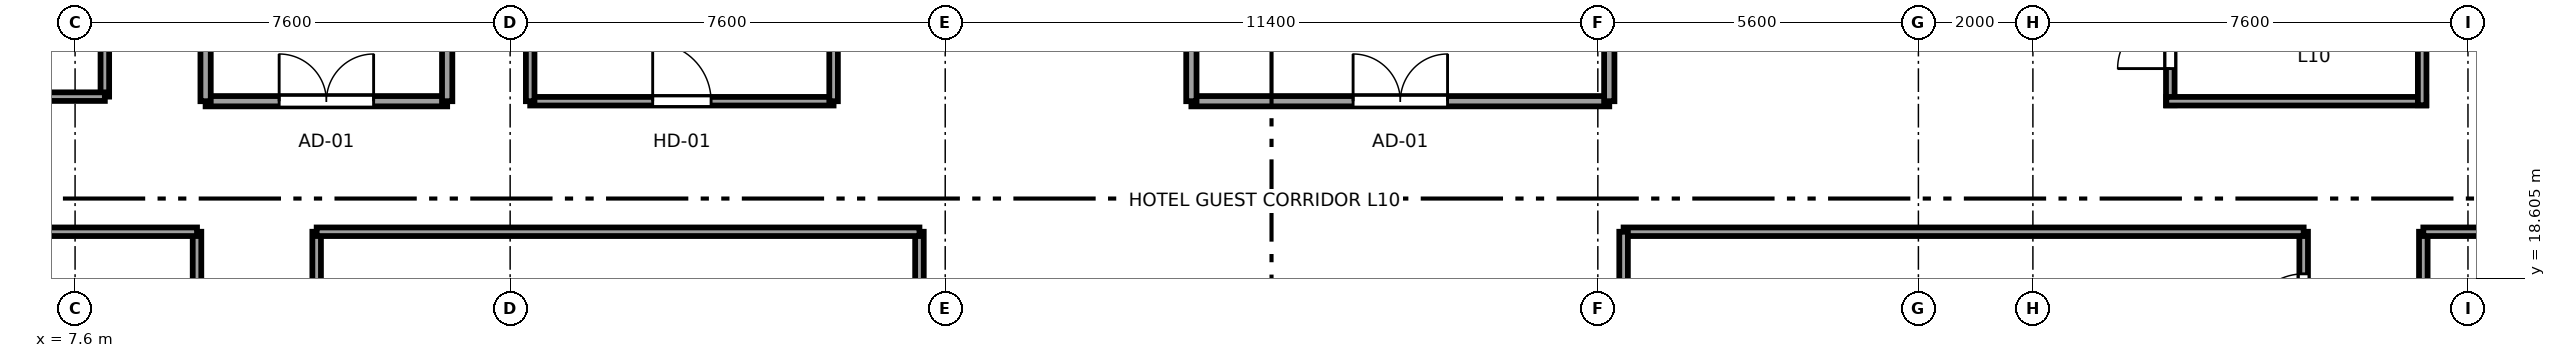
"""IFC4 building model, lengths in metres.
Left out: names, types, materials, properties, quantities, classifications, styles, units other than length and angle.
Written with IfcOpenShell. Run it as: python <this file> out.ifc"""

import sys

from ifc_helpers import new_model, si_unit, direction, frame, frame_2d, origin, place, context, subcontext, project, spatial, rectangle, extrude, source, transform, mapped, element, fill, save


model = new_model("IFC4")
c1 = context("Model", 3, precision=1e-05, world=origin(), true_north=direction((0.0, 1.0)))
c2 = subcontext(c1, "Body", "Model", "MODEL_VIEW")
j1 = project(units=[si_unit("LENGTHUNIT", "METRE"), si_unit("PLANEANGLEUNIT", "RADIAN")], contexts=[c1])
p1 = place(None, origin())
s1 = spatial("IfcSite", under=j1, at=p1, CompositionType="ELEMENT")
p2 = place(p1, origin())
s2 = spatial("IfcBuilding", under=s1, at=p2, CompositionType="ELEMENT")
p3 = place(p2, frame((0.0, 0.0, 46.2)))
s3 = spatial("IfcBuildingStorey", under=s2, at=p3, CompositionType="ELEMENT", Elevation=46.2)
p4 = place(p3, frame((9.73, 15.61, 0.0), z_axis=(0.0, 0.0, 1.0), x_axis=(0.0, 1.0, 0.0)))
e1 = element("IfcWall", 1, at=p4, inside=s3, PredefinedType="PARTITIONING", context=c2, shape_type="SweptSolid", body=[
    extrude(rectangle(XDim=3.81, YDim=0.15, at=frame_2d((1.905, 0.0))), origin(), (0.0, 0.0, 1.0), 3.37),
])
p5 = place(p4, frame((1.395, 0.0, 0.0)))
e2 = element("IfcOpeningElement", 2, at=p5, cuts=e1, PredefinedType="OPENING", context=c2, shape_type="SweptSolid", body=[
    extrude(rectangle(XDim=0.98, YDim=2.12, at=frame_2d((0.49, 1.06))), frame((0.0, 0.085, 0.0), z_axis=(0.0, -1.0, 0.0), x_axis=(1.0, 0.0, 0.0)), (0.0, 0.0, 1.0), 0.17),
])
p6 = place(p3, frame((0.405, 19.42, 0.0), z_axis=(0.0, 0.0, 1.0), x_axis=(1.0, 0.0, 0.0)))
e3 = element("IfcWall", 3, at=p6, inside=s3, PredefinedType="PARTITIONING", context=c2, shape_type="SweptSolid", body=[
    extrude(rectangle(XDim=9.325, YDim=0.15, at=frame_2d((4.663, 0.0))), origin(), (0.0, 0.0, 1.0), 3.37),
])
p7 = place(p3, frame((11.82, 16.81, 0.0), z_axis=(0.0, 0.0, 1.0), x_axis=(0.0, 1.0, 0.0)))
e4 = element("IfcWall", 4, at=p7, inside=s3, PredefinedType="PARTITIONING", context=c2, shape_type="SweptSolid", body=[
    extrude(rectangle(XDim=2.61, YDim=0.15, at=frame_2d((1.305, 0.0))), origin(), (0.0, 0.0, 1.0), 3.37),
])
p8 = place(p7, frame((0.795, 0.0, 0.0)))
e5 = element("IfcOpeningElement", 5, at=p8, cuts=e4, PredefinedType="OPENING", context=c2, shape_type="SweptSolid", body=[
    extrude(rectangle(XDim=0.98, YDim=2.12, at=frame_2d((0.49, 1.06))), frame((0.0, 0.085, 0.0), z_axis=(0.0, -1.0, 0.0), x_axis=(1.0, 0.0, 0.0)), (0.0, 0.0, 1.0), 0.17),
])
p9 = place(p3, frame((22.35, 14.88, 0.0), z_axis=(0.0, 0.0, 1.0), x_axis=(0.0, 1.0, 0.0)))
e6 = element("IfcWall", 6, at=p9, inside=s3, PredefinedType="PARTITIONING", context=c2, shape_type="SweptSolid", body=[
    extrude(rectangle(XDim=4.54, YDim=0.15, at=frame_2d((2.27, 0.0))), origin(), (0.0, 0.0, 1.0), 3.37),
])
p10 = place(p3, frame((11.82, 19.42, 0.0), z_axis=(0.0, 0.0, 1.0), x_axis=(1.0, 0.0, 0.0)))
e7 = element("IfcWall", 7, at=p10, inside=s3, PredefinedType="PARTITIONING", context=c2, shape_type="SweptSolid", body=[
    extrude(rectangle(XDim=10.53, YDim=0.15, at=frame_2d((5.265, 0.0))), origin(), (0.0, 0.0, 1.0), 3.37),
])
p11 = place(p3, frame((46.53, 17.01, 0.0), z_axis=(0.0, 0.0, 1.0), x_axis=(0.0, 1.0, 0.0)))
e8 = element("IfcWall", 8, at=p11, inside=s3, PredefinedType="PARTITIONING", context=c2, shape_type="SweptSolid", body=[
    extrude(rectangle(XDim=2.41, YDim=0.15, at=frame_2d((1.205, 0.0))), origin(), (0.0, 0.0, 1.0), 3.37),
])
p12 = place(p11, frame((0.695, 0.0, 0.0)))
e9 = element("IfcOpeningElement", 9, at=p12, cuts=e8, PredefinedType="OPENING", context=c2, shape_type="SweptSolid", body=[
    extrude(rectangle(XDim=0.98, YDim=2.12, at=frame_2d((0.49, 1.06))), frame((0.0, 0.085, 0.0), z_axis=(0.0, -1.0, 0.0), x_axis=(1.0, 0.0, 0.0)), (0.0, 0.0, 1.0), 0.17),
])
p13 = place(p3, frame((34.65, 19.42, 0.0), z_axis=(0.0, 0.0, 1.0), x_axis=(1.0, 0.0, 0.0)))
e10 = element("IfcWall", 10, at=p13, inside=s3, PredefinedType="PARTITIONING", context=c2, shape_type="SweptSolid", body=[
    extrude(rectangle(XDim=11.88, YDim=0.15, at=frame_2d((5.94, 0.0))), origin(), (0.0, 0.0, 1.0), 3.37),
])
p14 = place(p3, frame((34.65, 15.08, 0.0), z_axis=(0.0, 0.0, 1.0), x_axis=(0.0, 1.0, 0.0)))
e11 = element("IfcWall", 11, at=p14, inside=s3, PredefinedType="PARTITIONING", context=c2, shape_type="SweptSolid", body=[
    extrude(rectangle(XDim=4.34, YDim=0.15, at=frame_2d((2.17, 0.0))), origin(), (0.0, 0.0, 1.0), 3.37),
])
p15 = place(p3, frame((48.62, 15.41, 0.0), z_axis=(0.0, 0.0, 1.0), x_axis=(0.0, 1.0, 0.0)))
e12 = element("IfcWall", 12, at=p15, inside=s3, PredefinedType="PARTITIONING", context=c2, shape_type="SweptSolid", body=[
    extrude(rectangle(XDim=4.01, YDim=0.15, at=frame_2d((2.005, 0.0))), origin(), (0.0, 0.0, 1.0), 3.37),
])
p16 = place(p15, frame((1.795, 0.0, 0.0)))
e13 = element("IfcOpeningElement", 13, at=p16, cuts=e12, PredefinedType="OPENING", context=c2, shape_type="SweptSolid", body=[
    extrude(rectangle(XDim=0.98, YDim=2.12, at=frame_2d((0.49, 1.06))), frame((0.0, 0.085, 0.0), z_axis=(0.0, -1.0, 0.0), x_axis=(1.0, 0.0, 0.0)), (0.0, 0.0, 1.0), 0.17),
])
p17 = place(p3, frame((48.62, 19.42, 0.0), z_axis=(0.0, 0.0, 1.0), x_axis=(1.0, 0.0, 0.0)))
e14 = element("IfcWall", 14, at=p17, inside=s3, PredefinedType="PARTITIONING", context=c2, shape_type="SweptSolid", body=[
    extrude(rectangle(XDim=7.975, YDim=0.15, at=frame_2d((3.987, 0.0))), origin(), (0.0, 0.0, 1.0), 3.37),
])
p18 = place(p3, frame((8.12, 21.78, 0.0), z_axis=(0.0, 0.0, 1.0), x_axis=(0.0, 1.0, 0.0)))
e15 = element("IfcWall", 15, at=p18, inside=s3, PredefinedType="PARTITIONING", context=c2, shape_type="SweptSolid", body=[
    extrude(rectangle(XDim=5.24, YDim=0.15, at=frame_2d((2.62, 0.0))), origin(), (0.0, 0.0, 1.0), 3.37),
])
p19 = place(p18, frame((3.93, 0.0, 0.0)))
e16 = element("IfcOpeningElement", 16, at=p19, cuts=e15, PredefinedType="OPENING", context=c2, shape_type="SweptSolid", body=[
    extrude(rectangle(XDim=0.98, YDim=2.12, at=frame_2d((0.49, 1.06))), frame((0.0, 0.085, 0.0), z_axis=(0.0, -1.0, 0.0), x_axis=(1.0, 0.0, 0.0)), (0.0, 0.0, 1.0), 0.17),
])
p20 = place(p3, frame((0.405, 21.78, 0.0), z_axis=(0.0, 0.0, 1.0), x_axis=(1.0, 0.0, 0.0)))
e17 = element("IfcWall", 17, at=p20, inside=s3, PredefinedType="PARTITIONING", context=c2, shape_type="SweptSolid", body=[
    extrude(rectangle(XDim=7.715, YDim=0.15, at=frame_2d((3.857, 0.0))), origin(), (0.0, 0.0, 1.0), 3.37),
])
p21 = place(p3, frame((44.2, 21.63, 0.0), z_axis=(0.0, 0.0, 1.0), x_axis=(0.0, 1.0, 0.0)))
e18 = element("IfcWall", 18, at=p21, inside=s3, PredefinedType="PARTITIONING", context=c2, shape_type="SweptSolid", body=[
    extrude(rectangle(XDim=2.54, YDim=0.15, at=frame_2d((1.27, 0.0))), origin(), (0.0, 0.0, 1.0), 3.37),
])
p22 = place(p21, frame((0.64, 0.0, 0.0)))
e19 = element("IfcOpeningElement", 19, at=p22, cuts=e18, PredefinedType="OPENING", context=c2, shape_type="SweptSolid", body=[
    extrude(rectangle(XDim=0.92, YDim=2.01, at=frame_2d((0.46, 1.005))), frame((0.0, 0.085, 0.0), z_axis=(0.0, -1.0, 0.0), x_axis=(1.0, 0.0, 0.0)), (0.0, 0.0, 1.0), 0.17),
])
p23 = place(p3, frame((44.13, 21.7, 0.0), z_axis=(0.0, 0.0, 1.0), x_axis=(1.0, 0.0, 0.0)))
e20 = element("IfcWall", 20, at=p23, inside=s3, PredefinedType="PARTITIONING", context=c2, shape_type="SweptSolid", body=[
    extrude(rectangle(XDim=4.54, YDim=0.15, at=frame_2d((2.27, 0.0))), origin(), (0.0, 0.0, 1.0), 3.37),
])
p24 = place(p3, frame((48.6, 21.63, 0.0), z_axis=(0.0, 0.0, 1.0), x_axis=(0.0, 1.0, 0.0)))
e21 = element("IfcWall", 21, at=p24, inside=s3, PredefinedType="PARTITIONING", context=c2, shape_type="SweptSolid", body=[
    extrude(rectangle(XDim=2.54, YDim=0.15, at=frame_2d((1.27, 0.0))), origin(), (0.0, 0.0, 1.0), 3.37),
])
p25 = place(p3, frame((9.88, 21.7, 0.0), z_axis=(0.0, 0.0, 1.0), x_axis=(1.0, 0.0, 0.0)))
e22 = element("IfcWall", 22, at=p25, inside=s3, PredefinedType="PARTITIONING", context=c2, shape_type="SweptSolid", body=[
    extrude(rectangle(XDim=4.22, YDim=0.18, at=frame_2d((2.11, 0.0))), origin(), (0.0, 0.0, 1.0), 3.37),
])
p26 = place(p25, frame((1.285, 0.0, 0.0)))
e23 = element("IfcOpeningElement", 23, at=p26, cuts=e22, PredefinedType="OPENING", context=c2, shape_type="SweptSolid", body=[
    extrude(rectangle(XDim=1.65, YDim=2.15, at=frame_2d((0.825, 1.075))), frame((0.0, 0.1, 0.0), z_axis=(0.0, -1.0, 0.0), x_axis=(1.0, 0.0, 0.0)), (0.0, 0.0, 1.0), 0.2),
])
for number, where, z_axis, x_axis in (
    (24, (9.88, 21.7, 0.0), (0.0, 0.0, 1.0), (0.0, 1.0, 0.0)),
    (25, (14.1, 21.7, 0.0), (0.0, 0.0, 1.0), (0.0, 1.0, 0.0)),
):
    element("IfcWall", number, at=place(p3, frame(where, z_axis=z_axis, x_axis=x_axis)), inside=s3, PredefinedType="PARTITIONING", context=c2, shape_type="SweptSolid", body=[
        extrude(rectangle(XDim=8.05, YDim=0.18, at=frame_2d((4.025, 0.0))), origin(), (0.0, 0.0, 1.0), 3.37),
    ])
p27 = place(p3, frame((27.1, 21.7, 0.0), z_axis=(0.0, 0.0, 1.0), x_axis=(1.0, 0.0, 0.0)))
e26 = element("IfcWall", 26, at=p27, inside=s3, PredefinedType="PARTITIONING", context=c2, shape_type="SweptSolid", body=[
    extrude(rectangle(XDim=7.3, YDim=0.18, at=frame_2d((3.65, 0.0))), origin(), (0.0, 0.0, 1.0), 3.37),
])
p28 = place(p27, frame((2.825, 0.0, 0.0)))
e27 = element("IfcOpeningElement", 27, at=p28, cuts=e26, PredefinedType="OPENING", context=c2, shape_type="SweptSolid", body=[
    extrude(rectangle(XDim=1.65, YDim=2.15, at=frame_2d((0.825, 1.075))), frame((0.0, 0.1, 0.0), z_axis=(0.0, -1.0, 0.0), x_axis=(1.0, 0.0, 0.0)), (0.0, 0.0, 1.0), 0.2),
])
for number, where, z_axis, x_axis in (
    (28, (27.1, 21.7, 0.0), (0.0, 0.0, 1.0), (0.0, 1.0, 0.0)),
    (29, (34.4, 21.7, 0.0), (0.0, 0.0, 1.0), (0.0, 1.0, 0.0)),
):
    element("IfcWall", number, at=place(p3, frame(where, z_axis=z_axis, x_axis=x_axis)), inside=s3, PredefinedType="PARTITIONING", context=c2, shape_type="SweptSolid", body=[
        extrude(rectangle(XDim=8.1, YDim=0.18, at=frame_2d((4.05, 0.0))), origin(), (0.0, 0.0, 1.0), 3.37),
    ])
p29 = place(p3, frame((15.55, 21.7, 0.0), z_axis=(0.0, 0.0, 1.0), x_axis=(1.0, 0.0, 0.0)))
e30 = element("IfcWall", 30, at=p29, inside=s3, PredefinedType="PARTITIONING", context=c2, shape_type="SweptSolid", body=[
    extrude(rectangle(XDim=5.3, YDim=0.15, at=frame_2d((2.65, 0.0))), origin(), (0.0, 0.0, 1.0), 3.37),
])
p30 = place(p29, frame((2.14, 0.0, 0.0)))
e31 = element("IfcOpeningElement", 31, at=p30, cuts=e30, PredefinedType="OPENING", context=c2, shape_type="SweptSolid", body=[
    extrude(rectangle(XDim=1.02, YDim=2.03, at=frame_2d((0.51, 1.015))), frame((0.0, 0.085, 0.0), z_axis=(0.0, -1.0, 0.0), x_axis=(1.0, 0.0, 0.0)), (0.0, 0.0, 1.0), 0.17),
])
for number, where, z_axis, x_axis in (
    (32, (15.55, 21.7, 0.0), (0.0, 0.0, 1.0), (0.0, 1.0, 0.0)),
    (33, (20.85, 21.7, 0.0), (0.0, 0.0, 1.0), (0.0, 1.0, 0.0)),
):
    element("IfcWall", number, at=place(p3, frame(where, z_axis=z_axis, x_axis=x_axis)), inside=s3, PredefinedType="PARTITIONING", context=c2, shape_type="SweptSolid", body=[
        extrude(rectangle(XDim=8.1, YDim=0.15, at=frame_2d((4.05, 0.0))), origin(), (0.0, 0.0, 1.0), 3.37),
    ])
m1 = source(origin(), c2, "Body", "SweptSolid", [
    extrude(rectangle(XDim=0.98, YDim=2.12, at=frame_2d((0.49, 1.06))), frame((0.0, 0.025, 0.0), z_axis=(0.0, -1.0, 0.0), x_axis=(1.0, 0.0, 0.0)), (0.0, 0.0, 1.0), 0.05),
])
p31 = place(p12, origin())
e34 = element("IfcDoor", 34, at=p31, inside=s3, OperationType="SINGLE_SWING_LEFT", PredefinedType="DOOR", context=c2, shape_type="MappedRepresentation", body=[
    mapped(m1, transform((0.0, 0.0, 0.0), x_axis=(1.0, 0.0, 0.0), y_axis=(0.0, 1.0, 0.0), z_axis=(0.0, 0.0, 1.0), scale=1.0)),
])
fill(e9, e34)
m2 = source(origin(), c2, "Body", "SweptSolid", [
    extrude(rectangle(XDim=0.92, YDim=2.01, at=frame_2d((0.46, 1.005))), frame((0.0, 0.025, 0.0), z_axis=(0.0, -1.0, 0.0), x_axis=(1.0, 0.0, 0.0)), (0.0, 0.0, 1.0), 0.05),
])
p32 = place(p22, origin())
e35 = element("IfcDoor", 35, at=p32, inside=s3, OperationType="SINGLE_SWING_LEFT", PredefinedType="DOOR", context=c2, shape_type="MappedRepresentation", body=[
    mapped(m2, transform((0.0, 0.0, 0.0), x_axis=(1.0, 0.0, 0.0), y_axis=(0.0, 1.0, 0.0), z_axis=(0.0, 0.0, 1.0), scale=1.0)),
])
fill(e19, e35)
m3 = source(origin(), c2, "Body", "SweptSolid", [
    extrude(rectangle(XDim=1.65, YDim=2.15, at=frame_2d((0.825, 1.075))), frame((0.0, 0.025, 0.0), z_axis=(0.0, -1.0, 0.0), x_axis=(1.0, 0.0, 0.0)), (0.0, 0.0, 1.0), 0.05),
])
p33 = place(p26, origin())
e36 = element("IfcDoor", 36, at=p33, inside=s3, OperationType="DOUBLE_DOOR_SINGLE_SWING", PredefinedType="DOOR", context=c2, shape_type="MappedRepresentation", body=[
    mapped(m3, transform((0.0, 0.0, 0.0), x_axis=(1.0, 0.0, 0.0), y_axis=(0.0, 1.0, 0.0), z_axis=(0.0, 0.0, 1.0), scale=1.0)),
])
fill(e23, e36)
p34 = place(p28, origin())
e37 = element("IfcDoor", 37, at=p34, inside=s3, OperationType="DOUBLE_DOOR_SINGLE_SWING", PredefinedType="DOOR", context=c2, shape_type="MappedRepresentation", body=[
    mapped(m3, transform((0.0, 0.0, 0.0), x_axis=(1.0, 0.0, 0.0), y_axis=(0.0, 1.0, 0.0), z_axis=(0.0, 0.0, 1.0), scale=1.0)),
])
fill(e27, e37)
m4 = source(origin(), c2, "Body", "SweptSolid", [
    extrude(rectangle(XDim=1.02, YDim=2.03, at=frame_2d((0.51, 1.015))), frame((0.0, 0.025, 0.0), z_axis=(0.0, -1.0, 0.0), x_axis=(1.0, 0.0, 0.0)), (0.0, 0.0, 1.0), 0.05),
])
p35 = place(p30, origin())
e38 = element("IfcDoor", 38, at=p35, inside=s3, OperationType="SINGLE_SWING_LEFT", PredefinedType="DOOR", context=c2, shape_type="MappedRepresentation", body=[
    mapped(m4, transform((0.0, 0.0, 0.0), x_axis=(1.0, 0.0, 0.0), y_axis=(0.0, 1.0, 0.0), z_axis=(0.0, 0.0, 1.0), scale=1.0)),
])
fill(e31, e38)
save(model, sys.argv[1])
